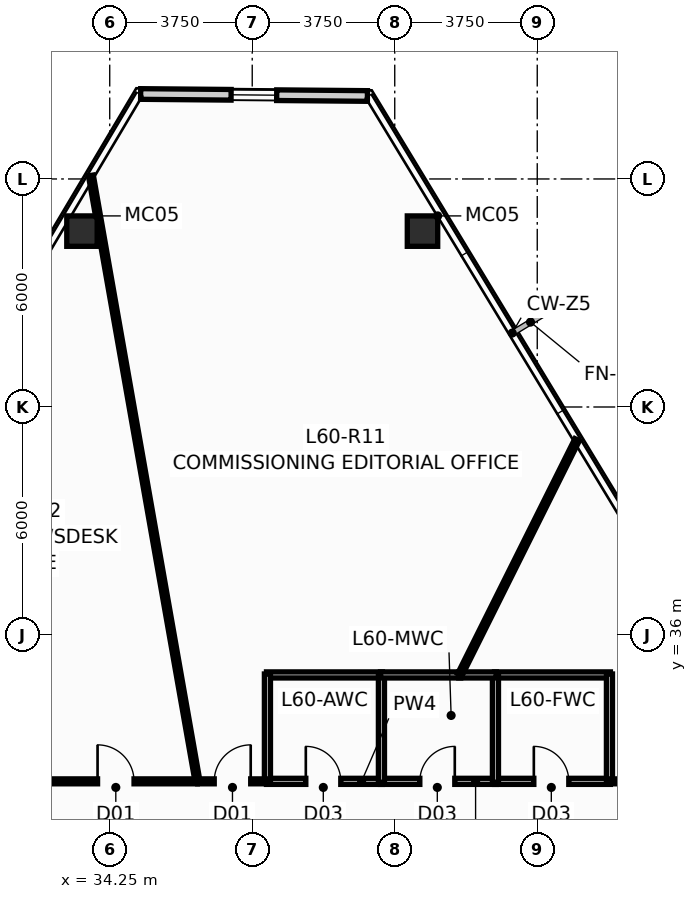
"""IFC4 building model, lengths in metres.
Left out: names, types, materials, properties, quantities, classifications, styles, units other than length and angle.
Written with IfcOpenShell. Run it as: python <this file> out.ifc"""

import sys

from ifc_helpers import new_model, si_unit, direction, frame, frame_2d, origin, origin_2d, place, context, subcontext, project, spatial, rectangle, hollow_rectangle, extrude, source, transform, mapped, element, fill, save


model = new_model("IFC4")
c1 = context("Model", 3, precision=1e-05, world=origin(), true_north=direction((0.0, 1.0)))
c2 = subcontext(c1, "Body", "Model", "MODEL_VIEW")
j1 = project(units=[si_unit("LENGTHUNIT", "METRE"), si_unit("PLANEANGLEUNIT", "RADIAN")], contexts=[c1])
p1 = place(None, origin())
s1 = spatial("IfcSite", under=j1, at=p1, CompositionType="ELEMENT")
p2 = place(p1, origin())
s2 = spatial("IfcBuilding", under=s1, at=p2, CompositionType="ELEMENT")
p3 = place(p2, frame((0.0, 0.0, 229.85)))
s3 = spatial("IfcBuildingStorey", under=s2, at=p3, CompositionType="ELEMENT", Elevation=229.85)
m1 = source(origin(), c2, "Body", "SweptSolid", [
    extrude(hollow_rectangle(XDim=0.8, YDim=0.8, WallThickness=0.045, at=origin_2d()), origin(), (0.0, 0.0, 1.0), 3.651),
])
for number, where, z_axis, x_axis in (
    (1, (42.48, 46.628, 0.0), (-0.024, 0.002, 1.0), (-0.075, -0.997, 0.0)),
    (2, (33.52, 46.628, 0.0), (0.024, 0.002, 1.0), (-0.075, 0.997, 0.0)),
):
    element("IfcColumn", number, at=place(p3, frame(where, z_axis=z_axis, x_axis=x_axis)), inside=s3, PredefinedType="COLUMN", context=c2, shape_type="MappedRepresentation", body=[
        mapped(m1, transform((0.0, 0.0, 0.0), scale=1.0)),
    ])
p4 = place(p3, frame((35.064, 50.236, 0.0), z_axis=(0.0, 0.0, 1.0), x_axis=(0.999961670369, -0.008755443618, 0.0)))
e3 = element("IfcWall", 3, at=p4, inside=s3, PredefinedType="STANDARD", context=c2, shape_type="SweptSolid", body=[
    extrude(rectangle(XDim=5.967, YDim=0.28, at=frame_2d((2.984, 0.0))), origin(), (0.0, 0.0, 1.0), 3.4),
])
p5 = place(p4, frame((2.38, 0.0, 0.9)))
e4 = element("IfcOpeningElement", 4, at=p5, cuts=e3, PredefinedType="OPENING", context=c2, shape_type="SweptSolid", body=[
    extrude(rectangle(XDim=1.2, YDim=1.65, at=frame_2d((0.6, 0.825))), frame((0.0, 0.152, 0.0), z_axis=(0.0, -1.0, 0.0), x_axis=(1.0, 0.0, 0.0)), (0.0, 0.0, 1.0), 0.304),
])
p6 = place(p3, frame((38.375, 32.15, 0.0), z_axis=(0.0, 0.0, 1.0), x_axis=(1.0, 0.0, 0.0)))
e5 = element("IfcWall", 5, at=p6, inside=s3, PredefinedType="PLUMBINGWALL", context=c2, shape_type="SweptSolid", body=[
    extrude(rectangle(XDim=3.05, YDim=0.16, at=frame_2d((1.525, 0.0))), origin(), (0.0, 0.0, 1.0), 3.4),
])
p7 = place(p6, frame((1.035, 0.0, 0.0)))
e6 = element("IfcOpeningElement", 6, at=p7, cuts=e5, PredefinedType="OPENING", context=c2, shape_type="SweptSolid", body=[
    extrude(rectangle(XDim=0.92, YDim=2.1, at=frame_2d((0.46, 1.05))), frame((0.0, 0.092, 0.0), z_axis=(0.0, -1.0, 0.0), x_axis=(1.0, 0.0, 0.0)), (0.0, 0.0, 1.0), 0.184),
])
p8 = place(p3, frame((41.375, 32.15, 0.0), z_axis=(0.0, 0.0, 1.0), x_axis=(1.0, 0.0, 0.0)))
e7 = element("IfcWall", 7, at=p8, inside=s3, PredefinedType="PLUMBINGWALL", context=c2, shape_type="SweptSolid", body=[
    extrude(rectangle(XDim=3.05, YDim=0.16, at=frame_2d((1.525, 0.0))), origin(), (0.0, 0.0, 1.0), 3.4),
])
p9 = place(p8, frame((1.035, 0.0, 0.0)))
e8 = element("IfcOpeningElement", 8, at=p9, cuts=e7, PredefinedType="OPENING", context=c2, shape_type="SweptSolid", body=[
    extrude(rectangle(XDim=0.92, YDim=2.1, at=frame_2d((0.46, 1.05))), frame((0.0, 0.092, 0.0), z_axis=(0.0, -1.0, 0.0), x_axis=(1.0, 0.0, 0.0)), (0.0, 0.0, 1.0), 0.184),
])
p10 = place(p3, frame((44.375, 32.15, 0.0), z_axis=(0.0, 0.0, 1.0), x_axis=(1.0, 0.0, 0.0)))
e9 = element("IfcWall", 9, at=p10, inside=s3, PredefinedType="PLUMBINGWALL", context=c2, shape_type="SweptSolid", body=[
    extrude(rectangle(XDim=3.05, YDim=0.16, at=frame_2d((1.525, 0.0))), origin(), (0.0, 0.0, 1.0), 3.4),
])
p11 = place(p10, frame((1.035, 0.0, 0.0)))
e10 = element("IfcOpeningElement", 10, at=p11, cuts=e9, PredefinedType="OPENING", context=c2, shape_type="SweptSolid", body=[
    extrude(rectangle(XDim=0.92, YDim=2.1, at=frame_2d((0.46, 1.05))), frame((0.0, 0.092, 0.0), z_axis=(0.0, -1.0, 0.0), x_axis=(1.0, 0.0, 0.0)), (0.0, 0.0, 1.0), 0.184),
])
for number, where, z_axis, x_axis in (
    (11, (38.375, 34.95, 0.0), (0.0, 0.0, 1.0), (1.0, 0.0, 0.0)),
    (12, (47.425, 34.95, 0.0), (0.0, 0.0, 1.0), (-1.0, 0.0, 0.0)),
):
    element("IfcWall", number, at=place(p3, frame(where, z_axis=z_axis, x_axis=x_axis)), inside=s3, PredefinedType="PLUMBINGWALL", context=c2, shape_type="SweptSolid", body=[
        extrude(rectangle(XDim=3.05, YDim=0.16, at=frame_2d((1.525, 0.0))), origin(), (0.0, 0.0, 1.0), 3.4),
    ])
for number, where, z_axis, x_axis in (
    (13, (41.4, 32.125, 0.0), (0.0, 0.0, 1.0), (0.0, 1.0, 0.0)),
    (14, (38.4, 32.125, 0.0), (0.0, 0.0, 1.0), (0.0, 1.0, 0.0)),
):
    element("IfcWall", number, at=place(p3, frame(where, z_axis=z_axis, x_axis=x_axis)), inside=s3, PredefinedType="PLUMBINGWALL", context=c2, shape_type="SweptSolid", body=[
        extrude(rectangle(XDim=2.85, YDim=0.16, at=frame_2d((1.425, 0.0))), origin(), (0.0, 0.0, 1.0), 3.4),
    ])
for number, where, z_axis, x_axis in (
    (15, (44.4, 32.125, 0.0), (0.0, 0.0, 1.0), (0.0, 1.0, 0.0)),
    (16, (47.4, 32.125, 0.0), (0.0, 0.0, 1.0), (0.0, 1.0, 0.0)),
):
    element("IfcWall", number, at=place(p3, frame(where, z_axis=z_axis, x_axis=x_axis)), inside=s3, PredefinedType="PLUMBINGWALL", context=c2, shape_type="SweptSolid", body=[
        extrude(rectangle(XDim=2.85, YDim=0.16, at=frame_2d((1.425, 0.0))), origin(), (0.0, 0.0, 1.0), 2.985),
    ])
p12 = place(p3, frame((41.375, 34.95, 0.0), z_axis=(0.0, 0.0, 1.0), x_axis=(1.0, 0.0, 0.0)))
e17 = element("IfcWall", 17, at=p12, inside=s3, PredefinedType="PLUMBINGWALL", context=c2, shape_type="SweptSolid", body=[
    extrude(rectangle(XDim=2.11, YDim=0.16, at=frame_2d((1.055, 0.0))), origin(), (0.0, 0.0, 1.0), 3.4),
])
p13 = place(p3, frame((43.435, 34.95, 0.0), z_axis=(0.0, 0.0, 1.0), x_axis=(1.0, 0.0, 0.0)))
e18 = element("IfcWall", 18, at=p13, inside=s3, PredefinedType="PLUMBINGWALL", context=c2, shape_type="SweptSolid", body=[
    extrude(rectangle(XDim=0.99, YDim=0.16, at=frame_2d((0.495, 0.0))), origin(), (0.0, 0.0, 1.0), 3.4),
])
p14 = place(p3, frame((33.754, 48.093, 0.0), z_axis=(0.0, 0.0, 1.0), x_axis=(0.17333175086, -0.984863495183, 0.0)))
e19 = element("IfcWall", 19, at=p14, inside=s3, PredefinedType="PARTITIONING", context=c2, shape_type="SweptSolid", body=[
    extrude(rectangle(XDim=16.182, YDim=0.13, at=frame_2d((8.091, 0.0))), origin(), (0.0, 0.0, 1.0), 3.4),
])
p15 = place(p3, frame((43.462, 34.954, 0.0), z_axis=(0.0, 0.0, 1.0), x_axis=(0.446662598545, 0.894702477398, 0.0)))
e20 = element("IfcWall", 20, at=p15, inside=s3, PredefinedType="PARTITIONING", context=c2, shape_type="SweptSolid", body=[
    extrude(rectangle(XDim=6.913, YDim=0.13, at=frame_2d((3.457, 0.0))), origin(), (0.0, 0.0, 1.0), 3.4),
])
p16 = place(p3, frame((32.265, 32.15, 0.0), z_axis=(0.0, 0.0, 1.0), x_axis=(1.0, 0.0, 0.0)))
e21 = element("IfcWall", 21, at=p16, inside=s3, PredefinedType="PARTITIONING", context=c2, shape_type="SweptSolid", body=[
    extrude(rectangle(XDim=4.29, YDim=0.13, at=frame_2d((2.145, 0.0))), origin(), (0.0, 0.0, 1.0), 3.4),
])
p17 = place(p16, frame((1.665, 0.0, 0.0)))
e22 = element("IfcOpeningElement", 22, at=p17, cuts=e21, PredefinedType="OPENING", context=c2, shape_type="SweptSolid", body=[
    extrude(rectangle(XDim=0.96, YDim=2.15, at=frame_2d((0.48, 1.075))), frame((0.0, 0.077, 0.0), z_axis=(0.0, -1.0, 0.0), x_axis=(1.0, 0.0, 0.0)), (0.0, 0.0, 1.0), 0.154),
])
p18 = place(p3, frame((50.595, 32.15, 0.0), z_axis=(0.0, 0.0, 1.0), x_axis=(-1.0, 0.0, 0.0)))
e23 = element("IfcWall", 23, at=p18, inside=s3, PredefinedType="PARTITIONING", context=c2, shape_type="SweptSolid", body=[
    extrude(rectangle(XDim=3.19, YDim=0.13, at=frame_2d((1.595, 0.0))), origin(), (0.0, 0.0, 1.0), 3.4),
])
p19 = place(p3, frame((36.565, 32.15, 0.0), z_axis=(0.0, 0.0, 1.0), x_axis=(1.0, 0.0, 0.0)))
e24 = element("IfcWall", 24, at=p19, inside=s3, PredefinedType="PARTITIONING", context=c2, shape_type="SweptSolid", body=[
    extrude(rectangle(XDim=1.83, YDim=0.13, at=frame_2d((0.915, 0.0))), origin(), (0.0, 0.0, 1.0), 3.4),
])
p20 = place(p19, frame((0.435, 0.0, 0.0)))
e25 = element("IfcOpeningElement", 25, at=p20, cuts=e24, PredefinedType="OPENING", context=c2, shape_type="SweptSolid", body=[
    extrude(rectangle(XDim=0.96, YDim=2.15, at=frame_2d((0.48, 1.075))), frame((0.0, 0.077, 0.0), z_axis=(0.0, -1.0, 0.0), x_axis=(1.0, 0.0, 0.0)), (0.0, 0.0, 1.0), 0.154),
])
p21 = place(p5, origin())
e26 = element("IfcWindow", 26, at=p21, inside=s3, PartitioningType="SINGLE_PANEL", PredefinedType="WINDOW", context=c2, shape_type="SweptSolid", body=[
    extrude(rectangle(XDim=1.2, YDim=1.65, at=frame_2d((0.6, 0.825))), frame((0.0, 0.03, 0.0), z_axis=(0.0, -1.0, 0.0), x_axis=(1.0, 0.0, 0.0)), (0.0, 0.0, 1.0), 0.06),
])
fill(e4, e26)
p22 = place(p7, origin())
e27 = element("IfcDoor", 27, at=p22, inside=s3, OperationType="SINGLE_SWING_LEFT", PredefinedType="DOOR", context=c2, shape_type="SweptSolid", body=[
    extrude(rectangle(XDim=0.92, YDim=2.1, at=frame_2d((0.46, 1.05))), frame((0.0, 0.025, 0.0), z_axis=(0.0, -1.0, 0.0), x_axis=(1.0, 0.0, 0.0)), (0.0, 0.0, 1.0), 0.05),
])
fill(e6, e27)
p23 = place(p9, origin())
e28 = element("IfcDoor", 28, at=p23, inside=s3, OperationType="SINGLE_SWING_RIGHT", PredefinedType="DOOR", context=c2, shape_type="SweptSolid", body=[
    extrude(rectangle(XDim=0.92, YDim=2.1, at=frame_2d((0.46, 1.05))), frame((0.0, 0.025, 0.0), z_axis=(0.0, -1.0, 0.0), x_axis=(1.0, 0.0, 0.0)), (0.0, 0.0, 1.0), 0.05),
])
fill(e8, e28)
p24 = place(p11, origin())
e29 = element("IfcDoor", 29, at=p24, inside=s3, OperationType="SINGLE_SWING_LEFT", PredefinedType="DOOR", context=c2, shape_type="SweptSolid", body=[
    extrude(rectangle(XDim=0.92, YDim=2.1, at=frame_2d((0.46, 1.05))), frame((0.0, 0.025, 0.0), z_axis=(0.0, -1.0, 0.0), x_axis=(1.0, 0.0, 0.0)), (0.0, 0.0, 1.0), 0.05),
])
fill(e10, e29)
p25 = place(p17, origin())
e30 = element("IfcDoor", 30, at=p25, inside=s3, OperationType="SINGLE_SWING_LEFT", PredefinedType="DOOR", context=c2, shape_type="SweptSolid", body=[
    extrude(rectangle(XDim=0.96, YDim=2.15, at=frame_2d((0.48, 1.075))), frame((0.0, 0.025, 0.0), z_axis=(0.0, -1.0, 0.0), x_axis=(1.0, 0.0, 0.0)), (0.0, 0.0, 1.0), 0.05),
])
fill(e22, e30)
p26 = place(p20, origin())
e31 = element("IfcDoor", 31, at=p26, inside=s3, OperationType="SINGLE_SWING_RIGHT", PredefinedType="DOOR", context=c2, shape_type="SweptSolid", body=[
    extrude(rectangle(XDim=0.96, YDim=2.15, at=frame_2d((0.48, 1.075))), frame((0.0, 0.025, 0.0), z_axis=(0.0, -1.0, 0.0), x_axis=(1.0, 0.0, 0.0)), (0.0, 0.0, 1.0), 0.05),
])
fill(e25, e31)
save(model, sys.argv[1])
